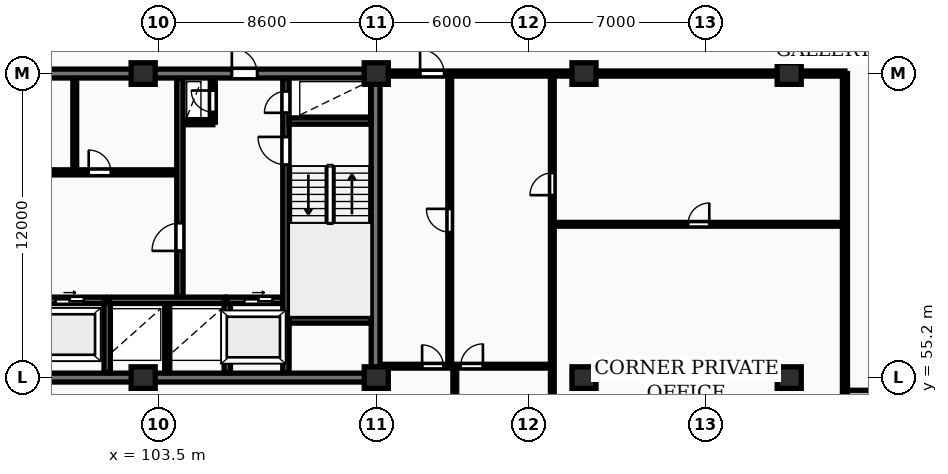
"""IFC4 building model, lengths in metres.
Left out: names, types, materials, properties, quantities, classifications, styles, units other than length and angle.
Written with IfcOpenShell. Run it as: python <this file> out.ifc"""

import sys

from ifc_helpers import new_model, si_unit, direction, frame, frame_2d, origin, origin_2d, place, context, subcontext, project, spatial, rectangle, extrude, element, fill, save


model = new_model("IFC4")
c1 = context("Model", 3, precision=1e-05, world=origin(), true_north=direction((0.0, 1.0)))
c2 = subcontext(c1, "Body", "Model", "MODEL_VIEW")
j1 = project(units=[si_unit("LENGTHUNIT", "METRE"), si_unit("PLANEANGLEUNIT", "RADIAN")], contexts=[c1])
p1 = place(None, origin())
s1 = spatial("IfcSite", under=j1, at=p1, CompositionType="ELEMENT")
p2 = place(p1, origin())
s2 = spatial("IfcBuilding", under=s1, at=p2, CompositionType="ELEMENT")
p3 = place(p2, frame((0.0, 0.0, 132.8)))
s3 = spatial("IfcBuildingStorey", under=s2, at=p3, CompositionType="ELEMENT", Elevation=132.8)
for number, where, z_axis, x_axis in (
    (1, (102.9, 55.2, 0.0), (0.0, 0.0, 1.0), (1.0, 0.0, 0.0)),
    (2, (102.9, 67.2, 0.0), (0.0, 0.0, 1.0), (1.0, 0.0, 0.0)),
    (3, (112.1, 55.2, 0.0), (0.0, 0.0, 1.0), (1.0, 0.0, 0.0)),
    (4, (112.1, 67.2, 0.0), (0.0, 0.0, 1.0), (1.0, 0.0, 0.0)),
    (5, (120.3, 55.2, 0.0), (0.0, 0.0, 1.0), (1.0, 0.0, 0.0)),
    (6, (120.3, 67.2, 0.0), (0.0, 0.0, 1.0), (1.0, 0.0, 0.0)),
    (7, (128.4, 55.2, 0.0), (0.0, 0.0, 1.0), (1.0, 0.0, 0.0)),
    (8, (128.4, 67.2, 0.0), (0.0, 0.0, 1.0), (1.0, 0.0, 0.0)),
):
    element("IfcColumn", number, at=place(p3, frame(where, z_axis=z_axis, x_axis=x_axis)), inside=s3, PredefinedType="COLUMN", context=c2, shape_type="SweptSolid", body=[
        extrude(rectangle(XDim=0.95, YDim=0.85, at=origin_2d()), origin(), (0.0, 0.0, 1.0), 3.25),
    ])
p4 = place(p3, frame((130.6, 54.55, 0.0), z_axis=(0.0, 0.0, 1.0), x_axis=(1.0, 0.0, 0.0)))
e9 = element("IfcWall", 9, at=p4, inside=s3, PredefinedType="STANDARD", context=c2, shape_type="SweptSolid", body=[
    extrude(rectangle(XDim=3.6, YDim=0.3, at=frame_2d((1.8, 0.0))), origin(), (0.0, 0.0, 1.0), 2.97),
])
p5 = place(p3, frame((75.95, 55.2, 0.0), z_axis=(0.0, 0.0, 1.0), x_axis=(1.0, 0.0, 0.0)))
e10 = element("IfcWall", 10, at=p5, inside=s3, PredefinedType="SHEAR", context=c2, shape_type="SweptSolid", body=[
    extrude(rectangle(XDim=36.3, YDim=0.35, at=frame_2d((18.15, 0.0))), origin(), (0.0, 0.0, 1.0), 3.25),
])
p6 = place(p3, frame((112.075, 55.375, 0.0), z_axis=(0.0, 0.0, 1.0), x_axis=(0.0, 1.0, 0.0)))
e11 = element("IfcWall", 11, at=p6, inside=s3, PredefinedType="SHEAR", context=c2, shape_type="SweptSolid", body=[
    extrude(rectangle(XDim=11.65, YDim=0.35, at=frame_2d((5.825, 0.0))), origin(), (0.0, 0.0, 1.0), 3.25),
])
p7 = place(p3, frame((75.95, 67.2, 0.0), z_axis=(0.0, 0.0, 1.0), x_axis=(1.0, 0.0, 0.0)))
e12 = element("IfcWall", 12, at=p7, inside=s3, PredefinedType="SHEAR", context=c2, shape_type="SweptSolid", body=[
    extrude(rectangle(XDim=36.3, YDim=0.35, at=frame_2d((18.15, 0.0))), origin(), (0.0, 0.0, 1.0), 3.25),
])
p8 = place(p7, frame((5.25, 0.0, 0.0)))
e13 = element("IfcOpeningElement", 13, at=p8, cuts=e12, PredefinedType="OPENING", context=c2, shape_type="SweptSolid", body=[
    extrude(rectangle(XDim=1.0, YDim=2.15, at=frame_2d((0.5, 1.075))), frame((0.0, 0.185, 0.0), z_axis=(0.0, -1.0, 0.0), x_axis=(1.0, 0.0, 0.0)), (0.0, 0.0, 1.0), 0.37),
])
p9 = place(p7, frame((21.6, 0.0, 0.0)))
e14 = element("IfcOpeningElement", 14, at=p9, cuts=e12, PredefinedType="OPENING", context=c2, shape_type="SweptSolid", body=[
    extrude(rectangle(XDim=1.5, YDim=2.2, at=frame_2d((0.75, 1.1))), frame((0.0, 0.185, 0.0), z_axis=(0.0, -1.0, 0.0), x_axis=(1.0, 0.0, 0.0)), (0.0, 0.0, 1.0), 0.37),
])
p10 = place(p7, frame((30.45, 0.0, 0.0)))
e15 = element("IfcOpeningElement", 15, at=p10, cuts=e12, PredefinedType="OPENING", context=c2, shape_type="SweptSolid", body=[
    extrude(rectangle(XDim=1.0, YDim=2.15, at=frame_2d((0.5, 1.075))), frame((0.0, 0.185, 0.0), z_axis=(0.0, -1.0, 0.0), x_axis=(1.0, 0.0, 0.0)), (0.0, 0.0, 1.0), 0.37),
])
p11 = place(p3, frame((93.02, 58.25, 0.0), z_axis=(0.0, 0.0, 1.0), x_axis=(1.0, 0.0, 0.0)))
e16 = element("IfcWall", 16, at=p11, inside=s3, PredefinedType="SHEAR", context=c2, shape_type="SweptSolid", body=[
    extrude(rectangle(XDim=8.36, YDim=0.25, at=frame_2d((4.18, 0.0))), origin(), (0.0, 0.0, 1.0), 3.25),
])
p12 = place(p11, frame((0.82, 0.0, 0.0)))
e17 = element("IfcOpeningElement", 17, at=p12, cuts=e16, PredefinedType="OPENING", context=c2, shape_type="SweptSolid", body=[
    extrude(rectangle(XDim=1.12, YDim=2.12, at=frame_2d((0.56, 1.06))), frame((0.0, 0.135, 0.0), z_axis=(0.0, -1.0, 0.0), x_axis=(1.0, 0.0, 0.0)), (0.0, 0.0, 1.0), 0.27),
])
p13 = place(p11, frame((3.62, 0.0, 0.0)))
e18 = element("IfcOpeningElement", 18, at=p13, cuts=e16, PredefinedType="OPENING", context=c2, shape_type="SweptSolid", body=[
    extrude(rectangle(XDim=1.12, YDim=2.12, at=frame_2d((0.56, 1.06))), frame((0.0, 0.135, 0.0), z_axis=(0.0, -1.0, 0.0), x_axis=(1.0, 0.0, 0.0)), (0.0, 0.0, 1.0), 0.27),
])
p14 = place(p11, frame((6.42, 0.0, 0.0)))
e19 = element("IfcOpeningElement", 19, at=p14, cuts=e16, PredefinedType="OPENING", context=c2, shape_type="SweptSolid", body=[
    extrude(rectangle(XDim=1.12, YDim=2.12, at=frame_2d((0.56, 1.06))), frame((0.0, 0.135, 0.0), z_axis=(0.0, -1.0, 0.0), x_axis=(1.0, 0.0, 0.0)), (0.0, 0.0, 1.0), 0.27),
])
p15 = place(p3, frame((101.48, 55.4, 0.0), z_axis=(0.0, 0.0, 1.0), x_axis=(0.0, 1.0, 0.0)))
e20 = element("IfcWall", 20, at=p15, inside=s3, PredefinedType="SHEAR", context=c2, shape_type="SweptSolid", body=[
    extrude(rectangle(XDim=2.85, YDim=0.25, at=frame_2d((1.425, 0.0))), origin(), (0.0, 0.0, 1.0), 3.25),
])
p16 = place(p3, frame((103.85, 55.4, 0.0), z_axis=(0.0, 0.0, 1.0), x_axis=(0.0, 1.0, 0.0)))
e21 = element("IfcWall", 21, at=p16, inside=s3, PredefinedType="PARTITIONING", context=c2, shape_type="SweptSolid", body=[
    extrude(rectangle(XDim=2.72, YDim=0.2, at=frame_2d((1.36, 0.0))), origin(), (0.0, 0.0, 1.0), 2.97),
])
p17 = place(p3, frame((101.55, 58.25, 0.0), z_axis=(0.0, 0.0, 1.0), x_axis=(1.0, 0.0, 0.0)))
e22 = element("IfcWall", 22, at=p17, inside=s3, PredefinedType="SHEAR", context=c2, shape_type="SweptSolid", body=[
    extrude(rectangle(XDim=4.6, YDim=0.25, at=frame_2d((2.3, 0.0))), origin(), (0.0, 0.0, 1.0), 3.25),
])
p18 = place(p3, frame((106.22, 55.4, 0.0), z_axis=(0.0, 0.0, 1.0), x_axis=(0.0, 1.0, 0.0)))
e23 = element("IfcWall", 23, at=p18, inside=s3, PredefinedType="SHEAR", context=c2, shape_type="SweptSolid", body=[
    extrude(rectangle(XDim=2.85, YDim=0.25, at=frame_2d((1.425, 0.0))), origin(), (0.0, 0.0, 1.0), 3.25),
])
p19 = place(p3, frame((106.22, 58.25, 0.0), z_axis=(0.0, 0.0, 1.0), x_axis=(1.0, 0.0, 0.0)))
e24 = element("IfcWall", 24, at=p19, inside=s3, PredefinedType="SHEAR", context=c2, shape_type="SweptSolid", body=[
    extrude(rectangle(XDim=2.46, YDim=0.25, at=frame_2d((1.23, 0.0))), origin(), (0.0, 0.0, 1.0), 3.25),
])
p20 = place(p19, frame((0.67, 0.0, 0.0)))
e25 = element("IfcOpeningElement", 25, at=p20, cuts=e24, PredefinedType="OPENING", context=c2, shape_type="SweptSolid", body=[
    extrude(rectangle(XDim=1.12, YDim=2.12, at=frame_2d((0.56, 1.06))), frame((0.0, 0.135, 0.0), z_axis=(0.0, -1.0, 0.0), x_axis=(1.0, 0.0, 0.0)), (0.0, 0.0, 1.0), 0.27),
])
p21 = place(p3, frame((100.2, 63.4, 0.0), z_axis=(0.0, 0.0, 1.0), x_axis=(0.0, 1.0, 0.0)))
e26 = element("IfcWall", 26, at=p21, inside=s3, PredefinedType="PARTITIONING", context=c2, shape_type="SweptSolid", body=[
    extrude(rectangle(XDim=3.6, YDim=0.15, at=frame_2d((1.8, 0.0))), origin(), (0.0, 0.0, 1.0), 2.97),
])
p22 = place(p3, frame((84.42, 63.3, 0.0), z_axis=(0.0, 0.0, 1.0), x_axis=(1.0, 0.0, 0.0)))
e27 = element("IfcWall", 27, at=p22, inside=s3, PredefinedType="PARTITIONING", context=c2, shape_type="SweptSolid", body=[
    extrude(rectangle(XDim=19.83, YDim=0.2, at=frame_2d((9.915, 0.0))), origin(), (0.0, 0.0, 1.0), 2.97),
])
p23 = place(p22, frame((1.15, 0.0, 0.0)))
e28 = element("IfcOpeningElement", 28, at=p23, cuts=e27, PredefinedType="OPENING", context=c2, shape_type="SweptSolid", body=[
    extrude(rectangle(XDim=0.85, YDim=2.05, at=frame_2d((0.425, 1.025))), frame((0.0, 0.11, 0.0), z_axis=(0.0, -1.0, 0.0), x_axis=(1.0, 0.0, 0.0)), (0.0, 0.0, 1.0), 0.22),
])
p24 = place(p22, frame((3.25, 0.0, 0.0)))
e29 = element("IfcOpeningElement", 29, at=p24, cuts=e27, PredefinedType="OPENING", context=c2, shape_type="SweptSolid", body=[
    extrude(rectangle(XDim=0.85, YDim=2.05, at=frame_2d((0.425, 1.025))), frame((0.0, 0.11, 0.0), z_axis=(0.0, -1.0, 0.0), x_axis=(1.0, 0.0, 0.0)), (0.0, 0.0, 1.0), 0.22),
])
p25 = place(p22, frame((13.08, 0.0, 0.0)))
e30 = element("IfcOpeningElement", 30, at=p25, cuts=e27, PredefinedType="OPENING", context=c2, shape_type="SweptSolid", body=[
    extrude(rectangle(XDim=1.5, YDim=2.2, at=frame_2d((0.75, 1.1))), frame((0.0, 0.11, 0.0), z_axis=(0.0, -1.0, 0.0), x_axis=(1.0, 0.0, 0.0)), (0.0, 0.0, 1.0), 0.22),
])
p26 = place(p22, frame((6.68, 0.0, 0.0)))
e31 = element("IfcOpeningElement", 31, at=p26, cuts=e27, PredefinedType="OPENING", context=c2, shape_type="SweptSolid", body=[
    extrude(rectangle(XDim=0.92, YDim=2.08, at=frame_2d((0.46, 1.04))), frame((0.0, 0.11, 0.0), z_axis=(0.0, -1.0, 0.0), x_axis=(1.0, 0.0, 0.0)), (0.0, 0.0, 1.0), 0.22),
])
p27 = place(p22, frame((16.33, 0.0, 0.0)))
e32 = element("IfcOpeningElement", 32, at=p27, cuts=e27, PredefinedType="OPENING", context=c2, shape_type="SweptSolid", body=[
    extrude(rectangle(XDim=0.88, YDim=2.06, at=frame_2d((0.44, 1.03))), frame((0.0, 0.11, 0.0), z_axis=(0.0, -1.0, 0.0), x_axis=(1.0, 0.0, 0.0)), (0.0, 0.0, 1.0), 0.22),
])
p28 = place(p3, frame((104.45, 65.28, 0.0), z_axis=(0.0, 0.0, 1.0), x_axis=(1.0, 0.0, 0.0)))
e33 = element("IfcWall", 33, at=p28, inside=s3, PredefinedType="PARTITIONING", context=c2, shape_type="SweptSolid", body=[
    extrude(rectangle(XDim=1.2, YDim=0.2, at=frame_2d((0.6, 0.0))), origin(), (0.0, 0.0, 1.0), 2.97),
])
p29 = place(p3, frame((105.65, 65.28, 0.0), z_axis=(0.0, 0.0, 1.0), x_axis=(0.0, 1.0, 0.0)))
e34 = element("IfcWall", 34, at=p29, inside=s3, PredefinedType="PARTITIONING", context=c2, shape_type="SweptSolid", body=[
    extrude(rectangle(XDim=1.72, YDim=0.2, at=frame_2d((0.86, 0.0))), origin(), (0.0, 0.0, 1.0), 2.97),
])
p30 = place(p29, frame((0.4, 0.0, 0.0)))
e35 = element("IfcOpeningElement", 35, at=p30, cuts=e34, PredefinedType="OPENING", context=c2, shape_type="SweptSolid", body=[
    extrude(rectangle(XDim=0.85, YDim=2.05, at=frame_2d((0.425, 1.025))), frame((0.0, 0.11, 0.0), z_axis=(0.0, -1.0, 0.0), x_axis=(1.0, 0.0, 0.0)), (0.0, 0.0, 1.0), 0.22),
])
p31 = place(p3, frame((104.35, 58.4, 0.0), z_axis=(0.0, 0.0, 1.0), x_axis=(0.0, 1.0, 0.0)))
e36 = element("IfcWall", 36, at=p31, inside=s3, PredefinedType="SHEAR", context=c2, shape_type="SweptSolid", body=[
    extrude(rectangle(XDim=8.6, YDim=0.25, at=frame_2d((4.3, 0.0))), origin(), (0.0, 0.0, 1.0), 3.25),
])
p32 = place(p31, frame((1.8, 0.0, 0.0)))
e37 = element("IfcOpeningElement", 37, at=p32, cuts=e36, PredefinedType="OPENING", context=c2, shape_type="SweptSolid", body=[
    extrude(rectangle(XDim=1.1, YDim=2.1, at=frame_2d((0.55, 1.05))), frame((0.0, 0.135, 0.0), z_axis=(0.0, -1.0, 0.0), x_axis=(1.0, 0.0, 0.0)), (0.0, 0.0, 1.0), 0.27),
])
p33 = place(p3, frame((108.535, 55.4, 0.0), z_axis=(0.0, 0.0, 1.0), x_axis=(0.0, 1.0, 0.0)))
e38 = element("IfcWall", 38, at=p33, inside=s3, PredefinedType="SHEAR", context=c2, shape_type="SweptSolid", body=[
    extrude(rectangle(XDim=11.6, YDim=0.25, at=frame_2d((5.8, 0.0))), origin(), (0.0, 0.0, 1.0), 3.25),
])
p34 = place(p33, frame((8.2, 0.0, 0.0)))
e39 = element("IfcOpeningElement", 39, at=p34, cuts=e38, PredefinedType="OPENING", context=c2, shape_type="SweptSolid", body=[
    extrude(rectangle(XDim=1.1, YDim=2.1, at=frame_2d((0.55, 1.05))), frame((0.0, 0.135, 0.0), z_axis=(0.0, -1.0, 0.0), x_axis=(1.0, 0.0, 0.0)), (0.0, 0.0, 1.0), 0.27),
])
p35 = place(p33, frame((10.25, 0.0, 0.0)))
e40 = element("IfcOpeningElement", 40, at=p35, cuts=e38, PredefinedType="OPENING", context=c2, shape_type="SweptSolid", body=[
    extrude(rectangle(XDim=0.85, YDim=2.05, at=frame_2d((0.425, 1.025))), frame((0.0, 0.135, 0.0), z_axis=(0.0, -1.0, 0.0), x_axis=(1.0, 0.0, 0.0)), (0.0, 0.0, 1.0), 0.27),
])
for number, where, z_axis, x_axis in (
    (41, (108.66, 57.475, 0.0), (0.0, 0.0, 1.0), (1.0, 0.0, 0.0)),
    (42, (108.66, 65.325, 0.0), (0.0, 0.0, 1.0), (1.0, 0.0, 0.0)),
):
    element("IfcWall", number, at=place(p3, frame(where, z_axis=z_axis, x_axis=x_axis)), inside=s3, PredefinedType="SHEAR", context=c2, shape_type="SweptSolid", body=[
        extrude(rectangle(XDim=3.24, YDim=0.25, at=frame_2d((1.62, 0.0))), origin(), (0.0, 0.0, 1.0), 3.25),
    ])
p36 = place(p3, frame((130.6, 51.1, 0.0), z_axis=(0.0, 0.0, 1.0), x_axis=(0.0, 1.0, 0.0)))
e43 = element("IfcWall", 43, at=p36, inside=s3, PredefinedType="PARTITIONING", context=c2, shape_type="SweptSolid", body=[
    extrude(rectangle(XDim=16.1, YDim=0.2, at=frame_2d((8.05, 0.0))), origin(), (0.0, 0.0, 1.0), 2.97),
])
p37 = place(p3, frame((119.05, 61.25, 0.0), z_axis=(0.0, 0.0, 1.0), x_axis=(1.0, 0.0, 0.0)))
e44 = element("IfcWall", 44, at=p37, inside=s3, PredefinedType="PARTITIONING", context=c2, shape_type="SweptSolid", body=[
    extrude(rectangle(XDim=11.55, YDim=0.15, at=frame_2d((5.775, 0.0))), origin(), (0.0, 0.0, 1.0), 2.97),
])
p38 = place(p37, frame((5.355, 0.0, 0.0)))
e45 = element("IfcOpeningElement", 45, at=p38, cuts=e44, PredefinedType="OPENING", context=c2, shape_type="SweptSolid", body=[
    extrude(rectangle(XDim=0.84, YDim=2.04, at=frame_2d((0.42, 1.02))), frame((0.0, 0.085, 0.0), z_axis=(0.0, -1.0, 0.0), x_axis=(1.0, 0.0, 0.0)), (0.0, 0.0, 1.0), 0.17),
])
p39 = place(p3, frame((119.05, 51.1, 0.0), z_axis=(0.0, 0.0, 1.0), x_axis=(0.0, 1.0, 0.0)))
e46 = element("IfcWall", 46, at=p39, inside=s3, PredefinedType="PARTITIONING", context=c2, shape_type="SweptSolid", body=[
    extrude(rectangle(XDim=16.05, YDim=0.15, at=frame_2d((8.025, 0.0))), origin(), (0.0, 0.0, 1.0), 2.97),
])
p40 = place(p39, frame((11.3, 0.0, 0.0)))
e47 = element("IfcOpeningElement", 47, at=p40, cuts=e46, PredefinedType="OPENING", context=c2, shape_type="SweptSolid", body=[
    extrude(rectangle(XDim=0.88, YDim=2.06, at=frame_2d((0.44, 1.03))), frame((0.0, 0.085, 0.0), z_axis=(0.0, -1.0, 0.0), x_axis=(1.0, 0.0, 0.0)), (0.0, 0.0, 1.0), 0.17),
])
p41 = place(p3, frame((115.0, 55.65, 0.0), z_axis=(0.0, 0.0, 1.0), x_axis=(0.0, 1.0, 0.0)))
e48 = element("IfcWall", 48, at=p41, inside=s3, PredefinedType="PARTITIONING", context=c2, shape_type="SweptSolid", body=[
    extrude(rectangle(XDim=11.5, YDim=0.15, at=frame_2d((5.75, 0.0))), origin(), (0.0, 0.0, 1.0), 2.97),
])
p42 = place(p41, frame((5.29, 0.0, 0.0)))
e49 = element("IfcOpeningElement", 49, at=p42, cuts=e48, PredefinedType="OPENING", context=c2, shape_type="SweptSolid", body=[
    extrude(rectangle(XDim=0.92, YDim=2.08, at=frame_2d((0.46, 1.04))), frame((0.0, 0.085, 0.0), z_axis=(0.0, -1.0, 0.0), x_axis=(1.0, 0.0, 0.0)), (0.0, 0.0, 1.0), 0.17),
])
p43 = place(p3, frame((115.2, 51.1, 0.0), z_axis=(0.0, 0.0, 1.0), x_axis=(0.0, 1.0, 0.0)))
e50 = element("IfcWall", 50, at=p43, inside=s3, PredefinedType="PARTITIONING", context=c2, shape_type="SweptSolid", body=[
    extrude(rectangle(XDim=4.55, YDim=0.15, at=frame_2d((2.275, 0.0))), origin(), (0.0, 0.0, 1.0), 2.97),
])
p44 = place(p3, frame((112.27, 55.65, 0.0), z_axis=(0.0, 0.0, 1.0), x_axis=(1.0, 0.0, 0.0)))
e51 = element("IfcWall", 51, at=p44, inside=s3, PredefinedType="PARTITIONING", context=c2, shape_type="SweptSolid", body=[
    extrude(rectangle(XDim=6.76, YDim=0.15, at=frame_2d((3.38, 0.0))), origin(), (0.0, 0.0, 1.0), 2.97),
])
p45 = place(p44, frame((1.64, 0.0, 0.0)))
e52 = element("IfcOpeningElement", 52, at=p45, cuts=e51, PredefinedType="OPENING", context=c2, shape_type="SweptSolid", body=[
    extrude(rectangle(XDim=0.84, YDim=2.04, at=frame_2d((0.42, 1.02))), frame((0.0, 0.085, 0.0), z_axis=(0.0, -1.0, 0.0), x_axis=(1.0, 0.0, 0.0)), (0.0, 0.0, 1.0), 0.17),
])
p46 = place(p44, frame((3.16, 0.0, 0.0)))
e53 = element("IfcOpeningElement", 53, at=p46, cuts=e51, PredefinedType="OPENING", context=c2, shape_type="SweptSolid", body=[
    extrude(rectangle(XDim=0.88, YDim=2.06, at=frame_2d((0.44, 1.03))), frame((0.0, 0.085, 0.0), z_axis=(0.0, -1.0, 0.0), x_axis=(1.0, 0.0, 0.0)), (0.0, 0.0, 1.0), 0.17),
])
p47 = place(p3, frame((112.25, 67.2, 0.0), z_axis=(0.0, 0.0, 1.0), x_axis=(1.0, 0.0, 0.0)))
e54 = element("IfcWall", 54, at=p47, inside=s3, PredefinedType="PARTITIONING", context=c2, shape_type="SweptSolid", body=[
    extrude(rectangle(XDim=18.35, YDim=0.2, at=frame_2d((9.175, 0.0))), origin(), (0.0, 0.0, 1.0), 2.433),
])
p48 = place(p47, frame((1.58, 0.0, 0.0)))
e55 = element("IfcOpeningElement", 55, at=p48, cuts=e54, PredefinedType="OPENING", context=c2, shape_type="SweptSolid", body=[
    extrude(rectangle(XDim=0.95, YDim=2.15, at=frame_2d((0.475, 1.075))), frame((0.0, 0.11, 0.0), z_axis=(0.0, -1.0, 0.0), x_axis=(1.0, 0.0, 0.0)), (0.0, 0.0, 1.0), 0.22),
])
p49 = place(p10, origin())
e56 = element("IfcDoor", 56, at=p49, inside=s3, OperationType="SINGLE_SWING_LEFT", PredefinedType="DOOR", context=c2, shape_type="SweptSolid", body=[
    extrude(rectangle(XDim=1.0, YDim=2.15, at=frame_2d((0.5, 1.075))), frame((0.0, 0.025, 0.0), z_axis=(0.0, -1.0, 0.0), x_axis=(1.0, 0.0, 0.0)), (0.0, 0.0, 1.0), 0.05),
])
fill(e15, e56)
p50 = place(p14, origin())
e57 = element("IfcDoor", 57, at=p50, inside=s3, OperationType="SLIDING_TO_RIGHT", PredefinedType="DOOR", context=c2, shape_type="SweptSolid", body=[
    extrude(rectangle(XDim=1.12, YDim=2.12, at=frame_2d((0.56, 1.06))), frame((0.0, 0.025, 0.0), z_axis=(0.0, -1.0, 0.0), x_axis=(1.0, 0.0, 0.0)), (0.0, 0.0, 1.0), 0.05),
])
fill(e19, e57)
p51 = place(p20, origin())
e58 = element("IfcDoor", 58, at=p51, inside=s3, OperationType="SLIDING_TO_RIGHT", PredefinedType="DOOR", context=c2, shape_type="SweptSolid", body=[
    extrude(rectangle(XDim=1.12, YDim=2.12, at=frame_2d((0.56, 1.06))), frame((0.0, 0.025, 0.0), z_axis=(0.0, -1.0, 0.0), x_axis=(1.0, 0.0, 0.0)), (0.0, 0.0, 1.0), 0.05),
])
fill(e25, e58)
p52 = place(p27, origin())
e59 = element("IfcDoor", 59, at=p52, inside=s3, OperationType="SINGLE_SWING_LEFT", PredefinedType="DOOR", context=c2, shape_type="SweptSolid", body=[
    extrude(rectangle(XDim=0.88, YDim=2.06, at=frame_2d((0.44, 1.03))), frame((0.0, 0.025, 0.0), z_axis=(0.0, -1.0, 0.0), x_axis=(1.0, 0.0, 0.0)), (0.0, 0.0, 1.0), 0.05),
])
fill(e32, e59)
p53 = place(p30, origin())
e60 = element("IfcDoor", 60, at=p53, inside=s3, OperationType="SINGLE_SWING_RIGHT", PredefinedType="DOOR", context=c2, shape_type="SweptSolid", body=[
    extrude(rectangle(XDim=0.85, YDim=2.05, at=frame_2d((0.425, 1.025))), frame((0.0, 0.025, 0.0), z_axis=(0.0, -1.0, 0.0), x_axis=(1.0, 0.0, 0.0)), (0.0, 0.0, 1.0), 0.05),
])
fill(e35, e60)
p54 = place(p32, origin())
e61 = element("IfcDoor", 61, at=p54, inside=s3, OperationType="SINGLE_SWING_LEFT", PredefinedType="DOOR", context=c2, shape_type="SweptSolid", body=[
    extrude(rectangle(XDim=1.1, YDim=2.1, at=frame_2d((0.55, 1.05))), frame((0.0, 0.025, 0.0), z_axis=(0.0, -1.0, 0.0), x_axis=(1.0, 0.0, 0.0)), (0.0, 0.0, 1.0), 0.05),
])
fill(e37, e61)
p55 = place(p34, origin())
e62 = element("IfcDoor", 62, at=p55, inside=s3, OperationType="SINGLE_SWING_RIGHT", PredefinedType="DOOR", context=c2, shape_type="SweptSolid", body=[
    extrude(rectangle(XDim=1.1, YDim=2.1, at=frame_2d((0.55, 1.05))), frame((0.0, 0.025, 0.0), z_axis=(0.0, -1.0, 0.0), x_axis=(1.0, 0.0, 0.0)), (0.0, 0.0, 1.0), 0.05),
])
fill(e39, e62)
p56 = place(p35, origin())
e63 = element("IfcDoor", 63, at=p56, inside=s3, OperationType="SINGLE_SWING_LEFT", PredefinedType="DOOR", context=c2, shape_type="SweptSolid", body=[
    extrude(rectangle(XDim=0.85, YDim=2.05, at=frame_2d((0.425, 1.025))), frame((0.0, 0.025, 0.0), z_axis=(0.0, -1.0, 0.0), x_axis=(1.0, 0.0, 0.0)), (0.0, 0.0, 1.0), 0.05),
])
fill(e40, e63)
p57 = place(p38, origin())
e64 = element("IfcDoor", 64, at=p57, inside=s3, OperationType="SINGLE_SWING_RIGHT", PredefinedType="DOOR", context=c2, shape_type="SweptSolid", body=[
    extrude(rectangle(XDim=0.84, YDim=2.04, at=frame_2d((0.42, 1.02))), frame((0.0, 0.025, 0.0), z_axis=(0.0, -1.0, 0.0), x_axis=(1.0, 0.0, 0.0)), (0.0, 0.0, 1.0), 0.05),
])
fill(e45, e64)
p58 = place(p40, origin())
e65 = element("IfcDoor", 65, at=p58, inside=s3, OperationType="SINGLE_SWING_LEFT", PredefinedType="DOOR", context=c2, shape_type="SweptSolid", body=[
    extrude(rectangle(XDim=0.88, YDim=2.06, at=frame_2d((0.44, 1.03))), frame((0.0, 0.025, 0.0), z_axis=(0.0, -1.0, 0.0), x_axis=(1.0, 0.0, 0.0)), (0.0, 0.0, 1.0), 0.05),
])
fill(e47, e65)
p59 = place(p42, origin())
e66 = element("IfcDoor", 66, at=p59, inside=s3, OperationType="SINGLE_SWING_RIGHT", PredefinedType="DOOR", context=c2, shape_type="SweptSolid", body=[
    extrude(rectangle(XDim=0.92, YDim=2.08, at=frame_2d((0.46, 1.04))), frame((0.0, 0.025, 0.0), z_axis=(0.0, -1.0, 0.0), x_axis=(1.0, 0.0, 0.0)), (0.0, 0.0, 1.0), 0.05),
])
fill(e49, e66)
p60 = place(p45, origin())
e67 = element("IfcDoor", 67, at=p60, inside=s3, OperationType="SINGLE_SWING_LEFT", PredefinedType="DOOR", context=c2, shape_type="SweptSolid", body=[
    extrude(rectangle(XDim=0.84, YDim=2.04, at=frame_2d((0.42, 1.02))), frame((0.0, 0.025, 0.0), z_axis=(0.0, -1.0, 0.0), x_axis=(1.0, 0.0, 0.0)), (0.0, 0.0, 1.0), 0.05),
])
fill(e52, e67)
p61 = place(p46, origin())
e68 = element("IfcDoor", 68, at=p61, inside=s3, OperationType="SINGLE_SWING_RIGHT", PredefinedType="DOOR", context=c2, shape_type="SweptSolid", body=[
    extrude(rectangle(XDim=0.88, YDim=2.06, at=frame_2d((0.44, 1.03))), frame((0.0, 0.025, 0.0), z_axis=(0.0, -1.0, 0.0), x_axis=(1.0, 0.0, 0.0)), (0.0, 0.0, 1.0), 0.05),
])
fill(e53, e68)
p62 = place(p48, origin())
e69 = element("IfcDoor", 69, at=p62, inside=s3, OperationType="SINGLE_SWING_LEFT", PredefinedType="DOOR", context=c2, shape_type="SweptSolid", body=[
    extrude(rectangle(XDim=0.95, YDim=2.15, at=frame_2d((0.475, 1.075))), frame((0.0, 0.025, 0.0), z_axis=(0.0, -1.0, 0.0), x_axis=(1.0, 0.0, 0.0)), (0.0, 0.0, 1.0), 0.05),
])
fill(e55, e69)
save(model, sys.argv[1])
